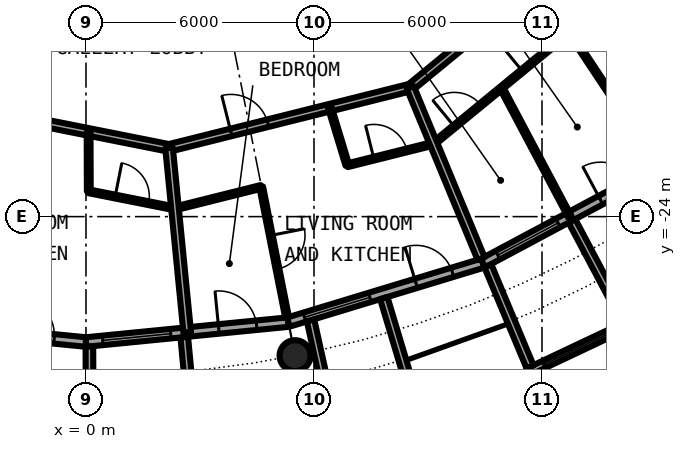
"""IFC4 building model, lengths in metres.
Left out: names, types, materials, properties, quantities, classifications, styles, units other than length and angle.
Written with IfcOpenShell. Run it as: python <this file> out.ifc"""

import sys

from ifc_helpers import new_model, si_unit, direction, frame, frame_2d, origin, origin_2d, place, context, subcontext, project, spatial, rectangle, circle, hollow_circle, extrude, element, fill, save


model = new_model("IFC4")
c1 = context("Model", 3, precision=1e-05, world=origin(), true_north=direction((0.0, 1.0)))
c2 = subcontext(c1, "Body", "Model", "MODEL_VIEW")
j1 = project(units=[si_unit("LENGTHUNIT", "METRE"), si_unit("PLANEANGLEUNIT", "RADIAN")], contexts=[c1])
p1 = place(None, origin())
s1 = spatial("IfcSite", under=j1, at=p1, CompositionType="ELEMENT")
p2 = place(p1, origin())
s2 = spatial("IfcBuilding", under=s1, at=p2, CompositionType="ELEMENT")
p3 = place(p2, frame((0.0, 0.0, 151.3)))
s3 = spatial("IfcBuildingStorey", under=s2, at=p3, CompositionType="ELEMENT", Elevation=151.3)
p4 = place(p3, frame((5.501, -27.658, 0.0), z_axis=(0.0, 0.0, 1.0), x_axis=(1.0, 0.0, 0.0)))
e1 = element("IfcColumn", 1, at=p4, inside=s3, PredefinedType="COLUMN", context=c2, shape_type="SweptSolid", body=[
    extrude(hollow_circle(Radius=0.406, WallThickness=0.04, at=origin_2d()), origin(), (0.0, 0.0, 1.0), 3.05),
])
p5 = place(p3, frame((-5.326, -26.775, 0.0), z_axis=(0.0, 0.0, 1.0), x_axis=(0.995173996315, -0.098126026407, 0.0)))
e2 = element("IfcWall", 2, at=p5, inside=s3, PredefinedType="SOLIDWALL", context=c2, shape_type="SweptSolid", body=[
    extrude(rectangle(XDim=5.352, YDim=0.25, at=frame_2d((2.676, 0.0))), origin(), (0.0, 0.0, 1.0), 2.7),
])
p6 = place(p5, frame((0.441, 0.0, 0.3)))
e3 = element("IfcOpeningElement", 3, at=p6, cuts=e2, PredefinedType="OPENING", context=c2, shape_type="SweptSolid", body=[
    extrude(rectangle(XDim=1.8, YDim=2.1, at=frame_2d((0.9, 1.05))), frame((0.0, 0.135, 0.0), z_axis=(0.0, -1.0, 0.0), x_axis=(1.0, 0.0, 0.0)), (0.0, 0.0, 1.0), 0.27),
])
p7 = place(p5, frame((3.51, 0.0, 0.0)))
e4 = element("IfcOpeningElement", 4, at=p7, cuts=e2, PredefinedType="OPENING", context=c2, shape_type="SweptSolid", body=[
    extrude(rectangle(XDim=1.0, YDim=2.2, at=frame_2d((0.5, 1.1))), frame((0.0, 0.135, 0.0), z_axis=(0.0, -1.0, 0.0), x_axis=(1.0, 0.0, 0.0)), (0.0, 0.0, 1.0), 0.27),
])
p8 = place(p3, frame((0.0, -27.3, 0.0), z_axis=(0.0, 0.0, 1.0), x_axis=(0.995173996315, 0.098126026407, 0.0)))
e5 = element("IfcWall", 5, at=p8, inside=s3, PredefinedType="SOLIDWALL", context=c2, shape_type="SweptSolid", body=[
    extrude(rectangle(XDim=5.352, YDim=0.25, at=frame_2d((2.676, 0.0))), origin(), (0.0, 0.0, 1.0), 2.7),
])
p9 = place(p8, frame((0.441, 0.0, 0.3)))
e6 = element("IfcOpeningElement", 6, at=p9, cuts=e5, PredefinedType="OPENING", context=c2, shape_type="SweptSolid", body=[
    extrude(rectangle(XDim=1.8, YDim=2.1, at=frame_2d((0.9, 1.05))), frame((0.0, 0.135, 0.0), z_axis=(0.0, -1.0, 0.0), x_axis=(1.0, 0.0, 0.0)), (0.0, 0.0, 1.0), 0.27),
])
p10 = place(p8, frame((3.51, 0.0, 0.0)))
e7 = element("IfcOpeningElement", 7, at=p10, cuts=e5, PredefinedType="OPENING", context=c2, shape_type="SweptSolid", body=[
    extrude(rectangle(XDim=1.0, YDim=2.2, at=frame_2d((0.5, 1.1))), frame((0.0, 0.135, 0.0), z_axis=(0.0, -1.0, 0.0), x_axis=(1.0, 0.0, 0.0)), (0.0, 0.0, 1.0), 0.27),
])
p11 = place(p3, frame((0.09, -27.417, -0.03), z_axis=(0.0, 0.0, 1.0), x_axis=(0.00347308367, -0.999993968827, 0.0)))
e8 = element("IfcWall", 8, at=p11, inside=s3, PredefinedType="SOLIDWALL", context=c2, shape_type="SweptSolid", body=[
    extrude(rectangle(XDim=2.882, YDim=0.2, at=frame_2d((1.441, 0.0))), origin(), (0.0, 0.0, 1.0), 2.73),
])
p12 = place(p3, frame((2.586, -27.171, -0.03), z_axis=(0.0, 0.0, 1.0), x_axis=(0.094548432284, -0.995520262954, 0.0)))
e9 = element("IfcWall", 9, at=p12, inside=s3, PredefinedType="SOLIDWALL", context=c2, shape_type="SweptSolid", body=[
    extrude(rectangle(XDim=3.006, YDim=0.2, at=frame_2d((1.503, 0.0))), origin(), (0.0, 0.0, 1.0), 2.73),
])
p13 = place(p3, frame((5.326, -26.775, 0.0), z_axis=(0.0, 0.0, 1.0), x_axis=(0.956965678721, 0.290201119486, 0.0)))
e10 = element("IfcWall", 10, at=p13, inside=s3, PredefinedType="SOLIDWALL", context=c2, shape_type="SweptSolid", body=[
    extrude(rectangle(XDim=5.351, YDim=0.25, at=frame_2d((2.676, 0.0))), origin(), (0.0, 0.0, 1.0), 2.7),
])
p14 = place(p13, frame((0.441, 0.0, 0.3)))
e11 = element("IfcOpeningElement", 11, at=p14, cuts=e10, PredefinedType="OPENING", context=c2, shape_type="SweptSolid", body=[
    extrude(rectangle(XDim=1.8, YDim=2.1, at=frame_2d((0.9, 1.05))), frame((0.0, 0.135, 0.0), z_axis=(0.0, -1.0, 0.0), x_axis=(1.0, 0.0, 0.0)), (0.0, 0.0, 1.0), 0.27),
])
p15 = place(p13, frame((3.51, 0.0, 0.0)))
e12 = element("IfcOpeningElement", 12, at=p15, cuts=e10, PredefinedType="OPENING", context=c2, shape_type="SweptSolid", body=[
    extrude(rectangle(XDim=1.0, YDim=2.2, at=frame_2d((0.5, 1.1))), frame((0.0, 0.135, 0.0), z_axis=(0.0, -1.0, 0.0), x_axis=(1.0, 0.0, 0.0)), (0.0, 0.0, 1.0), 0.27),
])
p16 = place(p3, frame((5.909, -26.729, -0.03), z_axis=(0.0, 0.0, 1.0), x_axis=(0.216409053917, -0.976302781612, 0.0)))
e13 = element("IfcWall", 13, at=p16, inside=s3, PredefinedType="SOLIDWALL", context=c2, shape_type="SweptSolid", body=[
    extrude(rectangle(XDim=2.925, YDim=0.2, at=frame_2d((1.463, 0.0))), origin(), (0.0, 0.0, 1.0), 2.73),
])
p17 = place(p3, frame((7.837, -26.144, -0.03), z_axis=(0.0, 0.0, 1.0), x_axis=(0.287064767992, -0.957911174889, 0.0)))
e14 = element("IfcWall", 14, at=p17, inside=s3, PredefinedType="SOLIDWALL", context=c2, shape_type="SweptSolid", body=[
    extrude(rectangle(XDim=3.006, YDim=0.2, at=frame_2d((1.503, 0.0))), origin(), (0.0, 0.0, 1.0), 2.73),
])
p18 = place(p3, frame((10.447, -25.222, 0.0), z_axis=(0.0, 0.0, 1.0), x_axis=(0.881915646801, 0.471407246368, 0.0)))
e15 = element("IfcWall", 15, at=p18, inside=s3, PredefinedType="SOLIDWALL", context=c2, shape_type="SweptSolid", body=[
    extrude(rectangle(XDim=5.352, YDim=0.25, at=frame_2d((2.676, 0.0))), origin(), (0.0, 0.0, 1.0), 2.7),
])
p19 = place(p18, frame((0.441, 0.0, 0.3)))
e16 = element("IfcOpeningElement", 16, at=p19, cuts=e15, PredefinedType="OPENING", context=c2, shape_type="SweptSolid", body=[
    extrude(rectangle(XDim=1.8, YDim=2.1, at=frame_2d((0.9, 1.05))), frame((0.0, 0.135, 0.0), z_axis=(0.0, -1.0, 0.0), x_axis=(1.0, 0.0, 0.0)), (0.0, 0.0, 1.0), 0.27),
])
p20 = place(p18, frame((3.51, 0.0, 0.0)))
e17 = element("IfcOpeningElement", 17, at=p20, cuts=e15, PredefinedType="OPENING", context=c2, shape_type="SweptSolid", body=[
    extrude(rectangle(XDim=1.0, YDim=2.2, at=frame_2d((0.5, 1.1))), frame((0.0, 0.135, 0.0), z_axis=(0.0, -1.0, 0.0), x_axis=(1.0, 0.0, 0.0)), (0.0, 0.0, 1.0), 0.27),
])
p21 = place(p3, frame((11.629, -28.088, -0.03), z_axis=(0.0, 0.0, 1.0), x_axis=(0.904000060331, 0.427532327342, 0.0)))
e18 = element("IfcWall", 18, at=p21, inside=s3, PredefinedType="SOLIDWALL", context=c2, shape_type="SweptSolid", body=[
    extrude(rectangle(XDim=2.993, YDim=0.2, at=frame_2d((1.497, 0.0))), origin(), (0.0, 0.0, 1.0), 2.73),
])
p22 = place(p21, frame((0.457, 0.0, 0.33)))
e19 = element("IfcOpeningElement", 19, at=p22, cuts=e18, PredefinedType="OPENING", context=c2, shape_type="SweptSolid", body=[
    extrude(circle(Radius=1.04, at=frame_2d((1.04, 1.04))), frame((0.0, 0.11, 0.0), z_axis=(0.0, -1.0, 0.0), x_axis=(1.0, 0.0, 0.0)), (0.0, 0.0, 1.0), 0.22),
])
p23 = place(p3, frame((10.575, -25.295, -0.03), z_axis=(0.0, 0.0, 1.0), x_axis=(0.385697364644, -0.922625353492, 0.0)))
e20 = element("IfcWall", 20, at=p23, inside=s3, PredefinedType="SOLIDWALL", context=c2, shape_type="SweptSolid", body=[
    extrude(rectangle(XDim=2.883, YDim=0.2, at=frame_2d((1.442, 0.0))), origin(), (0.0, 0.0, 1.0), 2.73),
])
p24 = place(p3, frame((12.787, -24.113, -0.03), z_axis=(0.0, 0.0, 1.0), x_axis=(0.468365282436, -0.883534924159, 0.0)))
e21 = element("IfcWall", 21, at=p24, inside=s3, PredefinedType="SOLIDWALL", context=c2, shape_type="SweptSolid", body=[
    extrude(rectangle(XDim=3.006, YDim=0.2, at=frame_2d((1.503, 0.0))), origin(), (0.0, 0.0, 1.0), 2.73),
])
p25 = place(p3, frame((2.341, -23.785, 0.0), z_axis=(0.0, 0.0, 1.0), x_axis=(0.970124059177, 0.242609376996, 0.0)))
e22 = element("IfcWall", 22, at=p25, inside=s3, PredefinedType="PARTITIONING", context=c2, shape_type="SweptSolid", body=[
    extrude(rectangle(XDim=2.337, YDim=0.1, at=frame_2d((1.168, 0.0))), origin(), (0.0, 0.0, 1.0), 2.7),
])
p26 = place(p3, frame((6.878, -22.649, 0.0), z_axis=(0.0, 0.0, 1.0), x_axis=(0.9700564467, 0.242879579658, 0.0)))
e23 = element("IfcWall", 23, at=p26, inside=s3, PredefinedType="PARTITIONING", context=c2, shape_type="SweptSolid", body=[
    extrude(rectangle(XDim=2.338, YDim=0.1, at=frame_2d((1.169, 0.0))), origin(), (0.0, 0.0, 1.0), 2.7),
])
p27 = place(p26, frame((0.719, 0.0, 0.0)))
e24 = element("IfcOpeningElement", 24, at=p27, cuts=e23, PredefinedType="OPENING", context=c2, shape_type="SweptSolid", body=[
    extrude(rectangle(XDim=0.9, YDim=2.3, at=frame_2d((0.45, 1.15))), frame((0.0, 0.06, 0.0), z_axis=(0.0, -1.0, 0.0), x_axis=(1.0, 0.0, 0.0)), (0.0, 0.0, 1.0), 0.12),
])
p28 = place(p3, frame((0.074, -23.334, 0.0), z_axis=(0.0, 0.0, 1.0), x_axis=(0.98081942231, -0.194918600496, 0.0)))
e25 = element("IfcWall", 25, at=p28, inside=s3, PredefinedType="PARTITIONING", context=c2, shape_type="SweptSolid", body=[
    extrude(rectangle(XDim=2.313, YDim=0.1, at=frame_2d((1.157, 0.0))), origin(), (0.0, 0.0, 1.0), 2.7),
])
p29 = place(p28, frame((0.707, 0.0, 0.0)))
e26 = element("IfcOpeningElement", 26, at=p29, cuts=e25, PredefinedType="OPENING", context=c2, shape_type="SweptSolid", body=[
    extrude(rectangle(XDim=0.9, YDim=2.3, at=frame_2d((0.45, 1.15))), frame((0.0, 0.06, 0.0), z_axis=(0.0, -1.0, 0.0), x_axis=(1.0, 0.0, 0.0)), (0.0, 0.0, 1.0), 0.12),
])
p30 = place(p3, frame((9.146, -22.081, 0.0), z_axis=(0.0, 0.0, 1.0), x_axis=(0.772956112865, 0.634459492469, 0.0)))
e27 = element("IfcWall", 27, at=p30, inside=s3, PredefinedType="PARTITIONING", context=c2, shape_type="SweptSolid", body=[
    extrude(rectangle(XDim=6.938, YDim=0.1, at=frame_2d((3.469, 0.0))), origin(), (0.0, 0.0, 1.0), 2.7),
])
p31 = place(p30, frame((3.018, 0.0, 0.0)))
e28 = element("IfcOpeningElement", 28, at=p31, cuts=e27, PredefinedType="OPENING", context=c2, shape_type="SweptSolid", body=[
    extrude(rectangle(XDim=0.9, YDim=2.3, at=frame_2d((0.45, 1.15))), frame((0.0, 0.06, 0.0), z_axis=(0.0, -1.0, 0.0), x_axis=(1.0, 0.0, 0.0)), (0.0, 0.0, 1.0), 0.12),
])
p32 = place(p30, frame((0.709, 0.0, 0.0)))
e29 = element("IfcOpeningElement", 29, at=p32, cuts=e27, PredefinedType="OPENING", context=c2, shape_type="SweptSolid", body=[
    extrude(rectangle(XDim=0.9, YDim=2.3, at=frame_2d((0.45, 1.15))), frame((0.0, 0.06, 0.0), z_axis=(0.0, -1.0, 0.0), x_axis=(1.0, 0.0, 0.0)), (0.0, 0.0, 1.0), 0.12),
])
p33 = place(p3, frame((2.186, -22.193, 0.0), z_axis=(0.0, 0.0, 1.0), x_axis=(0.97003047456, 0.242983288366, 0.0)))
e30 = element("IfcWall", 30, at=p33, inside=s3, PredefinedType="PARTITIONING", context=c2, shape_type="SweptSolid", body=[
    extrude(rectangle(XDim=6.544, YDim=0.2, at=frame_2d((3.272, 0.0))), origin(), (0.0, 0.0, 1.0), 2.7),
])
p34 = place(p33, frame((1.681, 0.0, 0.0)))
e31 = element("IfcOpeningElement", 31, at=p34, cuts=e30, PredefinedType="OPENING", context=c2, shape_type="SweptSolid", body=[
    extrude(rectangle(XDim=1.0, YDim=2.3, at=frame_2d((0.5, 1.15))), frame((0.0, 0.11, 0.0), z_axis=(0.0, -1.0, 0.0), x_axis=(1.0, 0.0, 0.0)), (0.0, 0.0, 1.0), 0.22),
])
p35 = place(p3, frame((-10.512, -19.667, 0.0), z_axis=(0.0, 0.0, 1.0), x_axis=(0.980780341017, -0.195115152343, 0.0)))
e32 = element("IfcWall", 32, at=p35, inside=s3, PredefinedType="PARTITIONING", context=c2, shape_type="SweptSolid", body=[
    extrude(rectangle(XDim=12.947, YDim=0.2, at=frame_2d((6.473, 0.0))), origin(), (0.0, 0.0, 1.0), 2.7),
])
p36 = place(p35, frame((4.894, 0.0, 0.0)))
e33 = element("IfcOpeningElement", 33, at=p36, cuts=e32, PredefinedType="OPENING", context=c2, shape_type="SweptSolid", body=[
    extrude(rectangle(XDim=1.0, YDim=2.3, at=frame_2d((0.5, 1.15))), frame((0.0, 0.11, 0.0), z_axis=(0.0, -1.0, 0.0), x_axis=(1.0, 0.0, 0.0)), (0.0, 0.0, 1.0), 0.22),
])
p37 = place(p3, frame((8.534, -20.603, 0.0), z_axis=(0.0, 0.0, 1.0), x_axis=(0.772983503654, 0.634426121056, 0.0)))
e34 = element("IfcWall", 34, at=p37, inside=s3, PredefinedType="PARTITIONING", context=c2, shape_type="SweptSolid", body=[
    extrude(rectangle(XDim=12.947, YDim=0.2, at=frame_2d((6.474, 0.0))), origin(), (0.0, 0.0, 1.0), 2.7),
])
p38 = place(p37, frame((4.895, 0.0, 0.0)))
e35 = element("IfcOpeningElement", 35, at=p38, cuts=e34, PredefinedType="OPENING", context=c2, shape_type="SweptSolid", body=[
    extrude(rectangle(XDim=1.0, YDim=2.3, at=frame_2d((0.5, 1.15))), frame((0.0, 0.11, 0.0), z_axis=(0.0, -1.0, 0.0), x_axis=(1.0, 0.0, 0.0)), (0.0, 0.0, 1.0), 0.22),
])
p39 = place(p3, frame((12.721, -19.147, 0.0), z_axis=(0.0, 0.0, 1.0), x_axis=(0.553609857728, -0.832776155654, 0.0)))
e36 = element("IfcWall", 36, at=p39, inside=s3, PredefinedType="PARTITIONING", context=c2, shape_type="SweptSolid", body=[
    extrude(rectangle(XDim=4.187, YDim=0.1, at=frame_2d((2.094, 0.0))), origin(), (0.0, 0.0, 1.0), 2.7),
])
p40 = place(p3, frame((0.074, -23.334, 0.0), z_axis=(0.0, 0.0, 1.0), x_axis=(-0.003125961595, 0.99999511417, 0.0)))
e37 = element("IfcWall", 37, at=p40, inside=s3, PredefinedType="PARTITIONING", context=c2, shape_type="SweptSolid", body=[
    extrude(rectangle(XDim=1.562, YDim=0.1, at=frame_2d((0.781, 0.0))), origin(), (0.0, 0.0, 1.0), 2.7),
])
p41 = place(p3, frame((2.186, -22.193, 0.0), z_axis=(0.0, 0.0, 1.0), x_axis=(0.098070432075, -0.995179476453, 0.0)))
e38 = element("IfcWall", 38, at=p41, inside=s3, PredefinedType="PARTITIONING", context=c2, shape_type="SweptSolid", body=[
    extrude(rectangle(XDim=4.874, YDim=0.2, at=frame_2d((2.437, 0.0))), origin(), (0.0, 0.0, 1.0), 2.7),
])
p42 = place(p3, frame((4.61, -23.217, 0.0), z_axis=(0.0, 0.0, 1.0), x_axis=(0.194816685017, -0.980839670506, 0.0)))
e39 = element("IfcWall", 39, at=p42, inside=s3, PredefinedType="PARTITIONING", context=c2, shape_type="SweptSolid", body=[
    extrude(rectangle(XDim=3.505, YDim=0.1, at=frame_2d((1.752, 0.0))), origin(), (0.0, 0.0, 1.0), 2.7),
])
p43 = place(p42, frame((1.303, 0.0, 0.0)))
e40 = element("IfcOpeningElement", 40, at=p43, cuts=e39, PredefinedType="OPENING", context=c2, shape_type="SweptSolid", body=[
    extrude(rectangle(XDim=0.9, YDim=2.3, at=frame_2d((0.45, 1.15))), frame((0.0, 0.06, 0.0), z_axis=(0.0, -1.0, 0.0), x_axis=(1.0, 0.0, 0.0)), (0.0, 0.0, 1.0), 0.12),
])
p44 = place(p3, frame((8.534, -20.603, 0.0), z_axis=(0.0, 0.0, 1.0), x_axis=(0.382651153718, -0.923892902104, 0.0)))
e41 = element("IfcWall", 41, at=p44, inside=s3, PredefinedType="PARTITIONING", context=c2, shape_type="SweptSolid", body=[
    extrude(rectangle(XDim=4.874, YDim=0.2, at=frame_2d((2.437, 0.0))), origin(), (0.0, 0.0, 1.0), 2.7),
])
p45 = place(p3, frame((10.934, -20.614, 0.0), z_axis=(0.0, 0.0, 1.0), x_axis=(0.468594334564, -0.883413464701, 0.0)))
e42 = element("IfcWall", 42, at=p45, inside=s3, PredefinedType="PARTITIONING", context=c2, shape_type="SweptSolid", body=[
    extrude(rectangle(XDim=3.841, YDim=0.1, at=frame_2d((1.92, 0.0))), origin(), (0.0, 0.0, 1.0), 2.7),
])
p46 = place(p3, frame((6.418, -21.133, 0.0), z_axis=(0.0, 0.0, 1.0), x_axis=(0.290358126892, -0.95691805195, 0.0)))
e43 = element("IfcWall", 43, at=p46, inside=s3, PredefinedType="PARTITIONING", context=c2, shape_type="SweptSolid", body=[
    extrude(rectangle(XDim=1.584, YDim=0.1, at=frame_2d((0.792, 0.0))), origin(), (0.0, 0.0, 1.0), 2.7),
])
p47 = place(p7, origin())
e44 = element("IfcDoor", 44, at=p47, inside=s3, OperationType="SINGLE_SWING_LEFT", PredefinedType="DOOR", context=c2, shape_type="SweptSolid", body=[
    extrude(rectangle(XDim=1.0, YDim=2.2, at=frame_2d((0.5, 1.1))), frame((0.0, 0.025, 0.0), z_axis=(0.0, -1.0, 0.0), x_axis=(1.0, 0.0, 0.0)), (0.0, 0.0, 1.0), 0.05),
])
fill(e4, e44)
p48 = place(p9, origin())
e45 = element("IfcWindow", 45, at=p48, inside=s3, PartitioningType="SINGLE_PANEL", PredefinedType="WINDOW", context=c2, shape_type="SweptSolid", body=[
    extrude(rectangle(XDim=1.8, YDim=2.1, at=frame_2d((0.9, 1.05))), frame((0.0, 0.03, 0.0), z_axis=(0.0, -1.0, 0.0), x_axis=(1.0, 0.0, 0.0)), (0.0, 0.0, 1.0), 0.06),
])
fill(e6, e45)
p49 = place(p10, origin())
e46 = element("IfcDoor", 46, at=p49, inside=s3, OperationType="SINGLE_SWING_LEFT", PredefinedType="DOOR", context=c2, shape_type="SweptSolid", body=[
    extrude(rectangle(XDim=1.0, YDim=2.2, at=frame_2d((0.5, 1.1))), frame((0.0, 0.025, 0.0), z_axis=(0.0, -1.0, 0.0), x_axis=(1.0, 0.0, 0.0)), (0.0, 0.0, 1.0), 0.05),
])
fill(e7, e46)
p50 = place(p14, origin())
e47 = element("IfcWindow", 47, at=p50, inside=s3, PartitioningType="SINGLE_PANEL", PredefinedType="WINDOW", context=c2, shape_type="SweptSolid", body=[
    extrude(rectangle(XDim=1.8, YDim=2.1, at=frame_2d((0.9, 1.05))), frame((0.0, 0.03, 0.0), z_axis=(0.0, -1.0, 0.0), x_axis=(1.0, 0.0, 0.0)), (0.0, 0.0, 1.0), 0.06),
])
fill(e11, e47)
p51 = place(p15, origin())
e48 = element("IfcDoor", 48, at=p51, inside=s3, OperationType="SINGLE_SWING_LEFT", PredefinedType="DOOR", context=c2, shape_type="SweptSolid", body=[
    extrude(rectangle(XDim=1.0, YDim=2.2, at=frame_2d((0.5, 1.1))), frame((0.0, 0.025, 0.0), z_axis=(0.0, -1.0, 0.0), x_axis=(1.0, 0.0, 0.0)), (0.0, 0.0, 1.0), 0.05),
])
fill(e12, e48)
p52 = place(p19, origin())
e49 = element("IfcWindow", 49, at=p52, inside=s3, PartitioningType="SINGLE_PANEL", PredefinedType="WINDOW", context=c2, shape_type="SweptSolid", body=[
    extrude(rectangle(XDim=1.8, YDim=2.1, at=frame_2d((0.9, 1.05))), frame((0.0, 0.03, 0.0), z_axis=(0.0, -1.0, 0.0), x_axis=(1.0, 0.0, 0.0)), (0.0, 0.0, 1.0), 0.06),
])
fill(e16, e49)
p53 = place(p22, origin())
e50 = element("IfcWindow", 50, at=p53, inside=s3, PartitioningType="SINGLE_PANEL", PredefinedType="WINDOW", context=c2, shape_type="SweptSolid", body=[
    extrude(circle(Radius=1.04, at=frame_2d((1.04, 1.04))), frame((0.0, 0.03, 0.0), z_axis=(0.0, -1.0, 0.0), x_axis=(1.0, 0.0, 0.0)), (0.0, 0.0, 1.0), 0.06),
])
fill(e19, e50)
p54 = place(p20, origin())
e51 = element("IfcDoor", 51, at=p54, inside=s3, OperationType="SINGLE_SWING_LEFT", PredefinedType="DOOR", context=c2, shape_type="SweptSolid", body=[
    extrude(rectangle(XDim=1.0, YDim=2.2, at=frame_2d((0.5, 1.1))), frame((0.0, 0.025, 0.0), z_axis=(0.0, -1.0, 0.0), x_axis=(1.0, 0.0, 0.0)), (0.0, 0.0, 1.0), 0.05),
])
fill(e17, e51)
p55 = place(p29, origin())
e52 = element("IfcDoor", 52, at=p55, inside=s3, OperationType="SINGLE_SWING_RIGHT", PredefinedType="DOOR", context=c2, shape_type="SweptSolid", body=[
    extrude(rectangle(XDim=0.9, YDim=2.3, at=frame_2d((0.45, 1.15))), frame((0.0, 0.025, 0.0), z_axis=(0.0, -1.0, 0.0), x_axis=(1.0, 0.0, 0.0)), (0.0, 0.0, 1.0), 0.05),
])
fill(e26, e52)
p56 = place(p34, origin())
e53 = element("IfcDoor", 53, at=p56, inside=s3, OperationType="SINGLE_SWING_LEFT", PredefinedType="DOOR", context=c2, shape_type="SweptSolid", body=[
    extrude(rectangle(XDim=1.0, YDim=2.3, at=frame_2d((0.5, 1.15))), frame((0.0, 0.025, 0.0), z_axis=(0.0, -1.0, 0.0), x_axis=(1.0, 0.0, 0.0)), (0.0, 0.0, 1.0), 0.05),
])
fill(e31, e53)
p57 = place(p27, origin())
e54 = element("IfcDoor", 54, at=p57, inside=s3, OperationType="SINGLE_SWING_LEFT", PredefinedType="DOOR", context=c2, shape_type="SweptSolid", body=[
    extrude(rectangle(XDim=0.9, YDim=2.3, at=frame_2d((0.45, 1.15))), frame((0.0, 0.025, 0.0), z_axis=(0.0, -1.0, 0.0), x_axis=(1.0, 0.0, 0.0)), (0.0, 0.0, 1.0), 0.05),
])
fill(e24, e54)
p58 = place(p43, origin())
e55 = element("IfcDoor", 55, at=p58, inside=s3, OperationType="SINGLE_SWING_RIGHT", PredefinedType="DOOR", context=c2, shape_type="SweptSolid", body=[
    extrude(rectangle(XDim=0.9, YDim=2.3, at=frame_2d((0.45, 1.15))), frame((0.0, 0.025, 0.0), z_axis=(0.0, -1.0, 0.0), x_axis=(1.0, 0.0, 0.0)), (0.0, 0.0, 1.0), 0.05),
])
fill(e40, e55)
p59 = place(p31, origin())
e56 = element("IfcDoor", 56, at=p59, inside=s3, OperationType="SINGLE_SWING_LEFT", PredefinedType="DOOR", context=c2, shape_type="SweptSolid", body=[
    extrude(rectangle(XDim=0.9, YDim=2.3, at=frame_2d((0.45, 1.15))), frame((0.0, 0.025, 0.0), z_axis=(0.0, -1.0, 0.0), x_axis=(1.0, 0.0, 0.0)), (0.0, 0.0, 1.0), 0.05),
])
fill(e28, e56)
p60 = place(p32, origin())
e57 = element("IfcDoor", 57, at=p60, inside=s3, OperationType="SINGLE_SWING_LEFT", PredefinedType="DOOR", context=c2, shape_type="SweptSolid", body=[
    extrude(rectangle(XDim=0.9, YDim=2.3, at=frame_2d((0.45, 1.15))), frame((0.0, 0.025, 0.0), z_axis=(0.0, -1.0, 0.0), x_axis=(1.0, 0.0, 0.0)), (0.0, 0.0, 1.0), 0.05),
])
fill(e29, e57)
save(model, sys.argv[1])
